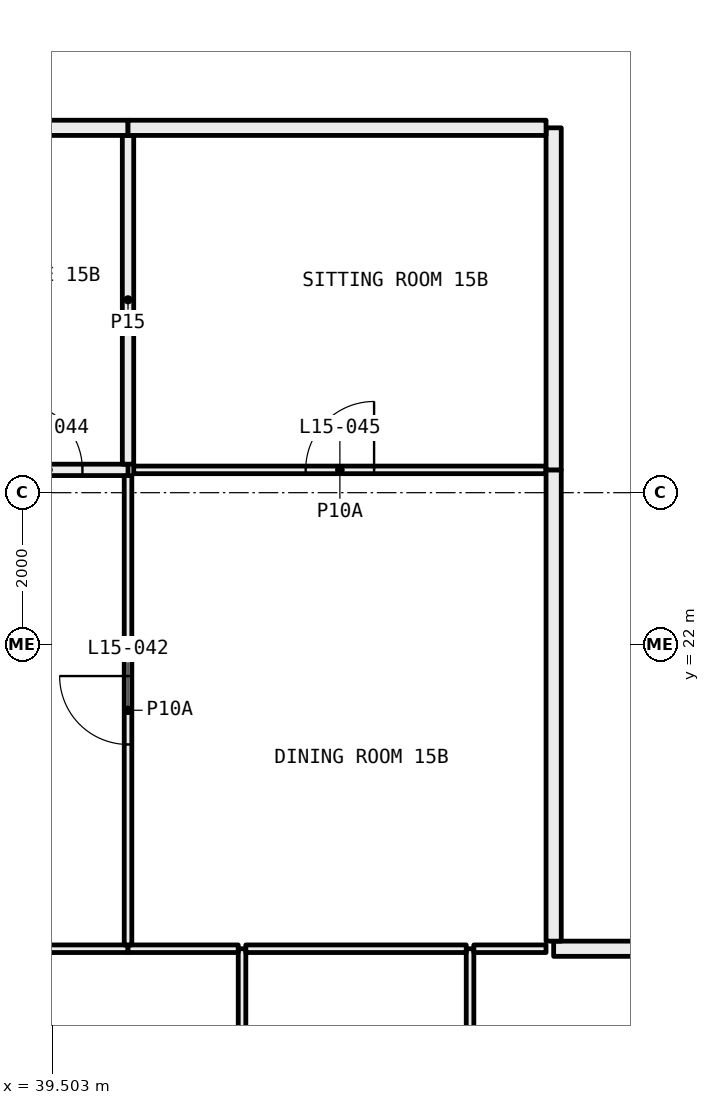
"""IFC4 building model, lengths in metres.
Left out: names, types, materials, properties, quantities, classifications, styles, units other than length and angle.
Written with IfcOpenShell. Run it as: python <this file> out.ifc"""

import sys

from ifc_helpers import new_model, si_unit, direction, frame, frame_2d, origin, place, context, subcontext, project, spatial, rectangle, extrude, element, fill, save


model = new_model("IFC4")
c1 = context("Model", 3, precision=1e-05, world=origin(), true_north=direction((0.0, 1.0)))
c2 = subcontext(c1, "Body", "Model", "MODEL_VIEW")
j1 = project(units=[si_unit("LENGTHUNIT", "METRE"), si_unit("PLANEANGLEUNIT", "RADIAN")], contexts=[c1])
p1 = place(None, origin())
s1 = spatial("IfcSite", under=j1, at=p1, CompositionType="ELEMENT")
p2 = place(p1, origin())
s2 = spatial("IfcBuilding", under=s1, at=p2, CompositionType="ELEMENT")
p3 = place(p2, frame((0.0, 0.0, 64.5)))
s3 = spatial("IfcBuildingStorey", under=s2, at=p3, CompositionType="ELEMENT", Elevation=64.5)
p4 = place(p3, frame((42.0, 12.05, 0.0), z_axis=(0.0, 0.0, 1.0), x_axis=(0.0, 1.0, 0.0)))
e1 = element("IfcWall", 1, at=p4, inside=s3, PredefinedType="PARTITIONING", context=c2, shape_type="SweptSolid", body=[
    extrude(rectangle(XDim=5.95, YDim=0.1, at=frame_2d((2.975, 0.0))), origin(), (0.0, 0.0, 1.0), 2.45),
])
p5 = place(p3, frame((40.5, 18.0, 0.0), z_axis=(0.0, 0.0, 1.0), x_axis=(-1.0, 0.0, 0.0)))
e2 = element("IfcWall", 2, at=p5, inside=s3, PredefinedType="PARTITIONING", context=c2, shape_type="SweptSolid", body=[
    extrude(rectangle(XDim=4.4, YDim=0.1, at=frame_2d((2.2, 0.0))), origin(), (0.0, 0.0, 1.0), 3.05),
])
p6 = place(p5, frame((1.75, 0.0, 0.0)))
e3 = element("IfcOpeningElement", 3, at=p6, cuts=e2, PredefinedType="OPENING", context=c2, shape_type="SweptSolid", body=[
    extrude(rectangle(XDim=0.9, YDim=2.1, at=frame_2d((0.45, 1.05))), frame((0.0, 0.06, 0.0), z_axis=(0.0, -1.0, 0.0), x_axis=(1.0, 0.0, 0.0)), (0.0, 0.0, 1.0), 0.12),
])
p7 = place(p3, frame((41.95, 18.0, 0.0), z_axis=(0.0, 0.0, 1.0), x_axis=(-1.0, 0.0, 0.0)))
e4 = element("IfcWall", 4, at=p7, inside=s3, PredefinedType="PARTITIONING", context=c2, shape_type="SweptSolid", body=[
    extrude(rectangle(XDim=1.45, YDim=0.1, at=frame_2d((0.725, 0.0))), origin(), (0.0, 0.0, 1.0), 3.05),
])
p8 = place(p3, frame((45.0, 12.05, 0.0), z_axis=(0.0, 0.0, 1.0), x_axis=(0.0, 1.0, 0.0)))
e5 = element("IfcWall", 5, at=p8, inside=s3, PredefinedType="PARTITIONING", context=c2, shape_type="SweptSolid", body=[
    extrude(rectangle(XDim=5.95, YDim=0.1, at=frame_2d((2.975, 0.0))), origin(), (0.0, 0.0, 1.0), 2.45),
])
p9 = place(p3, frame((44.95, 18.0, 0.0), z_axis=(0.0, 0.0, 1.0), x_axis=(-1.0, 0.0, 0.0)))
e6 = element("IfcWall", 6, at=p9, inside=s3, PredefinedType="PARTITIONING", context=c2, shape_type="SweptSolid", body=[
    extrude(rectangle(XDim=2.9, YDim=0.1, at=frame_2d((1.45, 0.0))), origin(), (0.0, 0.0, 1.0), 3.05),
])
p10 = place(p3, frame((46.0, 18.0, 0.0), z_axis=(0.0, 0.0, 1.0), x_axis=(-1.0, 0.0, 0.0)))
e7 = element("IfcWall", 7, at=p10, inside=s3, PredefinedType="PARTITIONING", context=c2, shape_type="SweptSolid", body=[
    extrude(rectangle(XDim=0.95, YDim=0.1, at=frame_2d((0.475, 0.0))), origin(), (0.0, 0.0, 1.0), 3.05),
])
p11 = place(p3, frame((49.5, 18.0, 0.0), z_axis=(0.0, 0.0, 1.0), x_axis=(-1.0, 0.0, 0.0)))
e8 = element("IfcWall", 8, at=p11, inside=s3, PredefinedType="PARTITIONING", context=c2, shape_type="SweptSolid", body=[
    extrude(rectangle(XDim=3.4, YDim=0.2, at=frame_2d((1.7, 0.0))), origin(), (0.0, 0.0, 1.0), 3.05),
])
p12 = place(p3, frame((40.5, 18.05, 0.0), z_axis=(0.0, 0.0, 1.0), x_axis=(0.0, 1.0, 0.0)))
e9 = element("IfcWall", 9, at=p12, inside=s3, PredefinedType="PARTITIONING", context=c2, shape_type="SweptSolid", body=[
    extrude(rectangle(XDim=6.175, YDim=0.1, at=frame_2d((3.087, 0.0))), origin(), (0.0, 0.0, 1.0), 2.45),
])
p13 = place(p12, frame((2.637, 0.0, 0.0)))
e10 = element("IfcOpeningElement", 10, at=p13, cuts=e9, PredefinedType="OPENING", context=c2, shape_type="SweptSolid", body=[
    extrude(rectangle(XDim=0.9, YDim=2.1, at=frame_2d((0.45, 1.05))), frame((0.0, 0.06, 0.0), z_axis=(0.0, -1.0, 0.0), x_axis=(1.0, 0.0, 0.0)), (0.0, 0.0, 1.0), 0.12),
])
p14 = place(p3, frame((40.5, 24.3, 0.0), z_axis=(0.0, 0.0, 1.0), x_axis=(-1.0, 0.0, 0.0)))
e11 = element("IfcWall", 11, at=p14, inside=s3, PredefinedType="PARTITIONING", context=c2, shape_type="SweptSolid", body=[
    extrude(rectangle(XDim=2.1, YDim=0.15, at=frame_2d((1.05, 0.0))), origin(), (0.0, 0.0, 1.0), 3.05),
])
p15 = place(p14, frame((0.6, 0.0, 0.0)))
e12 = element("IfcOpeningElement", 12, at=p15, cuts=e11, PredefinedType="OPENING", context=c2, shape_type="SweptSolid", body=[
    extrude(rectangle(XDim=0.9, YDim=2.1, at=frame_2d((0.45, 1.05))), frame((0.0, 0.085, 0.0), z_axis=(0.0, -1.0, 0.0), x_axis=(1.0, 0.0, 0.0)), (0.0, 0.0, 1.0), 0.17),
])
p16 = place(p3, frame((46.0, 24.3, 0.0), z_axis=(0.0, 0.0, 1.0), x_axis=(-1.0, 0.0, 0.0)))
e13 = element("IfcWall", 13, at=p16, inside=s3, PredefinedType="PARTITIONING", context=c2, shape_type="SweptSolid", body=[
    extrude(rectangle(XDim=5.425, YDim=0.1, at=frame_2d((2.712, 0.0))), origin(), (0.0, 0.0, 1.0), 3.05),
])
p17 = place(p16, frame((2.262, 0.0, 0.0)))
e14 = element("IfcOpeningElement", 14, at=p17, cuts=e13, PredefinedType="OPENING", context=c2, shape_type="SweptSolid", body=[
    extrude(rectangle(XDim=0.9, YDim=2.1, at=frame_2d((0.45, 1.05))), frame((0.0, 0.06, 0.0), z_axis=(0.0, -1.0, 0.0), x_axis=(1.0, 0.0, 0.0)), (0.0, 0.0, 1.0), 0.12),
])
p18 = place(p3, frame((46.1, 18.1, 0.0), z_axis=(0.0, 0.0, 1.0), x_axis=(0.0, 1.0, 0.0)))
e15 = element("IfcWall", 15, at=p18, inside=s3, PredefinedType="PARTITIONING", context=c2, shape_type="SweptSolid", body=[
    extrude(rectangle(XDim=6.2, YDim=0.2, at=frame_2d((3.1, 0.0))), origin(), (0.0, 0.0, 1.0), 2.45),
])
p19 = place(p3, frame((40.5, 24.375, 0.0), z_axis=(0.0, 0.0, 1.0), x_axis=(0.0, 1.0, 0.0)))
e16 = element("IfcWall", 16, at=p19, inside=s3, PredefinedType="PARTITIONING", context=c2, shape_type="SweptSolid", body=[
    extrude(rectangle(XDim=4.325, YDim=0.15, at=frame_2d((2.163, 0.0))), origin(), (0.0, 0.0, 1.0), 3.05),
])
p20 = place(p3, frame((40.5, 28.8, 0.0), z_axis=(0.0, 0.0, 1.0), x_axis=(-1.0, 0.0, 0.0)))
e17 = element("IfcWall", 17, at=p20, inside=s3, PredefinedType="PARTITIONING", context=c2, shape_type="SweptSolid", body=[
    extrude(rectangle(XDim=2.1, YDim=0.2, at=frame_2d((1.05, 0.0))), origin(), (0.0, 0.0, 1.0), 3.05),
])
p21 = place(p3, frame((46.1, 24.3, 0.0), z_axis=(0.0, 0.0, 1.0), x_axis=(0.0, 1.0, 0.0)))
e18 = element("IfcWall", 18, at=p21, inside=s3, PredefinedType="PARTITIONING", context=c2, shape_type="SweptSolid", body=[
    extrude(rectangle(XDim=4.5, YDim=0.2, at=frame_2d((2.25, 0.0))), origin(), (0.0, 0.0, 1.0), 3.05),
])
p22 = place(p3, frame((46.0, 28.8, 0.0), z_axis=(0.0, 0.0, 1.0), x_axis=(-1.0, 0.0, 0.0)))
e19 = element("IfcWall", 19, at=p22, inside=s3, PredefinedType="PARTITIONING", context=c2, shape_type="SweptSolid", body=[
    extrude(rectangle(XDim=5.5, YDim=0.2, at=frame_2d((2.75, 0.0))), origin(), (0.0, 0.0, 1.0), 3.05),
])
p23 = place(p13, origin())
e20 = element("IfcDoor", 20, at=p23, inside=s3, OperationType="SINGLE_SWING_LEFT", PredefinedType="DOOR", context=c2, shape_type="SweptSolid", body=[
    extrude(rectangle(XDim=0.9, YDim=2.1, at=frame_2d((0.45, 1.05))), frame((0.0, 0.025, 0.0), z_axis=(0.0, -1.0, 0.0), x_axis=(1.0, 0.0, 0.0)), (0.0, 0.0, 1.0), 0.05),
])
fill(e10, e20)
p24 = place(p15, frame((0.9, 0.0, 0.0), x_axis=(-1.0, 0.0, 0.0)))
e21 = element("IfcDoor", 21, at=p24, inside=s3, OperationType="SINGLE_SWING_RIGHT", PredefinedType="DOOR", context=c2, shape_type="SweptSolid", body=[
    extrude(rectangle(XDim=0.9, YDim=2.1, at=frame_2d((0.45, 1.05))), frame((0.0, 0.025, 0.0), z_axis=(0.0, -1.0, 0.0), x_axis=(1.0, 0.0, 0.0)), (0.0, 0.0, 1.0), 0.05),
])
fill(e12, e21)
p25 = place(p17, frame((0.9, 0.0, 0.0), x_axis=(-1.0, 0.0, 0.0)))
e22 = element("IfcDoor", 22, at=p25, inside=s3, OperationType="SINGLE_SWING_LEFT", PredefinedType="DOOR", context=c2, shape_type="SweptSolid", body=[
    extrude(rectangle(XDim=0.9, YDim=2.1, at=frame_2d((0.45, 1.05))), frame((0.0, 0.025, 0.0), z_axis=(0.0, -1.0, 0.0), x_axis=(1.0, 0.0, 0.0)), (0.0, 0.0, 1.0), 0.05),
])
fill(e14, e22)
save(model, sys.argv[1])
